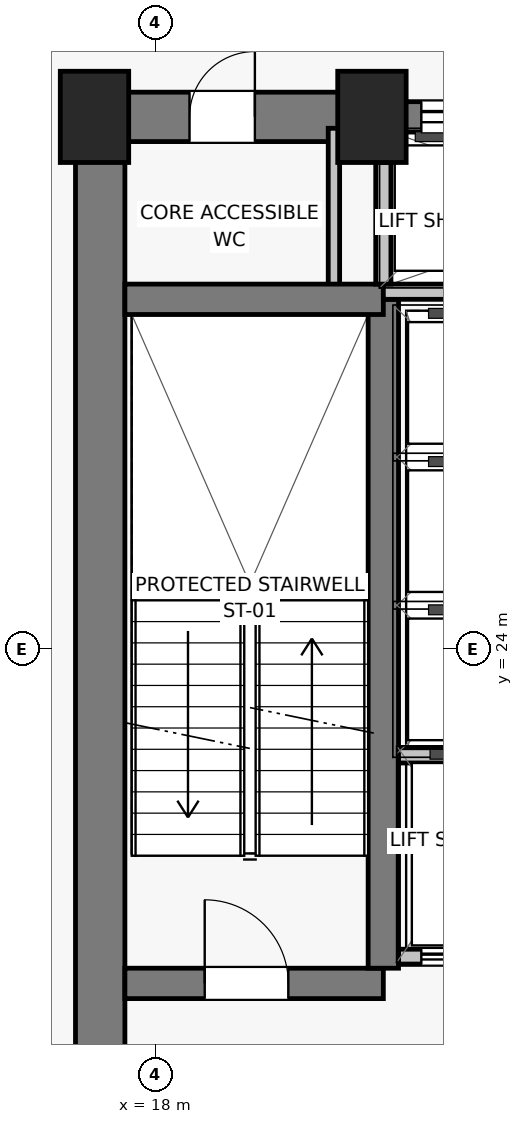
"""IFC4 building model, lengths in metres.
Left out: names, types, materials, properties, quantities, classifications, styles, units other than length and angle.
Written with IfcOpenShell. Run it as: python <this file> out.ifc"""

import sys

from ifc_helpers import new_model, si_unit, direction, frame, frame_2d, origin, origin_2d, place, context, subcontext, project, spatial, rectangle, extrude, source, transform, mapped, element, fill, save


model = new_model("IFC4")
c1 = context("Model", 3, precision=1e-05, world=origin(), true_north=direction((0.0, 1.0)))
c2 = subcontext(c1, "Body", "Model", "MODEL_VIEW")
j1 = project(units=[si_unit("LENGTHUNIT", "METRE"), si_unit("PLANEANGLEUNIT", "RADIAN")], contexts=[c1])
p1 = place(None, origin())
s1 = spatial("IfcSite", under=j1, at=p1, CompositionType="ELEMENT")
p2 = place(p1, origin())
s2 = spatial("IfcBuilding", under=s1, at=p2, CompositionType="ELEMENT")
p3 = place(p2, frame((0.0, 0.0, 85.15)))
s3 = spatial("IfcBuildingStorey", under=s2, at=p3, CompositionType="ELEMENT", Elevation=85.15)
for number, where, z_axis, x_axis in (
    (1, (17.2, 31.0, 0.0), (0.0, 0.0, 1.0), (1.0, 0.0, 0.0)),
    (2, (20.85, 31.0, 0.0), (0.0, 0.0, 1.0), (1.0, 0.0, 0.0)),
):
    element("IfcColumn", number, at=place(p3, frame(where, z_axis=z_axis, x_axis=x_axis)), inside=s3, PredefinedType="PILASTER", context=c2, shape_type="SweptSolid", body=[
        extrude(rectangle(XDim=0.9, YDim=1.2, at=origin_2d()), origin(), (0.0, 0.0, 1.0), 4.3),
    ])
p4 = place(p3, frame((17.275, 16.8, 0.0), z_axis=(0.0, 0.0, 1.0), x_axis=(0.0, 1.0, 0.0)))
e3 = element("IfcWall", 3, at=p4, inside=s3, PredefinedType="SHEAR", context=c2, shape_type="SweptSolid", body=[
    extrude(rectangle(XDim=14.2, YDim=0.65, at=frame_2d((7.1, 0.0))), origin(), (0.0, 0.0, 1.0), 4.05),
])
p5 = place(p3, frame((17.2, 31.0, 0.0), z_axis=(0.0, 0.0, 1.0), x_axis=(1.0, 0.0, 0.0)))
e4 = element("IfcWall", 4, at=p5, inside=s3, PredefinedType="SHEAR", context=c2, shape_type="SweptSolid", body=[
    extrude(rectangle(XDim=3.8, YDim=0.65, at=frame_2d((1.9, 0.0))), origin(), (0.0, 0.0, 1.0), 4.05),
])
p6 = place(p5, frame((1.25, 0.0, 0.0)))
e5 = element("IfcOpeningElement", 5, at=p6, cuts=e4, PredefinedType="OPENING", context=c2, shape_type="SweptSolid", body=[
    extrude(rectangle(XDim=0.86, YDim=2.01, at=frame_2d((0.43, 1.005))), frame((0.0, 0.335, 0.0), z_axis=(0.0, -1.0, 0.0), x_axis=(1.0, 0.0, 0.0)), (0.0, 0.0, 1.0), 0.67),
])
p7 = place(p3, frame((21.0, 31.0, 0.0), z_axis=(0.0, 0.0, 1.0), x_axis=(1.0, 0.0, 0.0)))
e6 = element("IfcWall", 6, at=p7, inside=s3, PredefinedType="SHEAR", context=c2, shape_type="SweptSolid", body=[
    extrude(rectangle(XDim=6.0, YDim=0.4, at=frame_2d((3.0, 0.0))), origin(), (0.0, 0.0, 1.0), 4.05),
])
p8 = place(p7, frame((0.5, 0.0, 0.0)))
e7 = element("IfcOpeningElement", 7, at=p8, cuts=e6, PredefinedType="OPENING", context=c2, shape_type="SweptSolid", body=[
    extrude(rectangle(XDim=1.1, YDim=2.08, at=frame_2d((0.55, 1.04))), frame((0.0, 0.21, 0.0), z_axis=(0.0, -1.0, 0.0), x_axis=(1.0, 0.0, 0.0)), (0.0, 0.0, 1.0), 0.42),
])
p9 = place(p7, frame((2.45, 0.0, 0.0)))
e8 = element("IfcOpeningElement", 8, at=p9, cuts=e6, PredefinedType="OPENING", context=c2, shape_type="SweptSolid", body=[
    extrude(rectangle(XDim=1.1, YDim=2.08, at=frame_2d((0.55, 1.04))), frame((0.0, 0.21, 0.0), z_axis=(0.0, -1.0, 0.0), x_axis=(1.0, 0.0, 0.0)), (0.0, 0.0, 1.0), 0.42),
])
p10 = place(p7, frame((4.4, 0.0, 0.0)))
e9 = element("IfcOpeningElement", 9, at=p10, cuts=e6, PredefinedType="OPENING", context=c2, shape_type="SweptSolid", body=[
    extrude(rectangle(XDim=1.1, YDim=2.08, at=frame_2d((0.55, 1.04))), frame((0.0, 0.21, 0.0), z_axis=(0.0, -1.0, 0.0), x_axis=(1.0, 0.0, 0.0)), (0.0, 0.0, 1.0), 0.42),
])
p11 = place(p3, frame((20.35, 28.65, 0.0), z_axis=(0.0, 0.0, 1.0), x_axis=(0.0, 1.0, 0.0)))
e10 = element("IfcWall", 10, at=p11, inside=s3, PredefinedType="PARTITIONING", context=c2, shape_type="SweptSolid", body=[
    extrude(rectangle(XDim=2.2, YDim=0.15, at=frame_2d((1.1, 0.0))), origin(), (0.0, 0.0, 1.0), 4.05),
])
p12 = place(p3, frame((17.6, 19.6, 0.0), z_axis=(0.0, 0.0, 1.0), x_axis=(1.0, 0.0, 0.0)))
e11 = element("IfcWall", 11, at=p12, inside=s3, PredefinedType="SHEAR", context=c2, shape_type="SweptSolid", body=[
    extrude(rectangle(XDim=3.4, YDim=0.4, at=frame_2d((1.7, 0.0))), origin(), (0.0, 0.0, 1.0), 4.05),
])
p13 = place(p12, frame((1.05, 0.0, 0.0)))
e12 = element("IfcOpeningElement", 12, at=p13, cuts=e11, PredefinedType="OPENING", context=c2, shape_type="SweptSolid", body=[
    extrude(rectangle(XDim=1.1, YDim=2.03, at=frame_2d((0.55, 1.015))), frame((0.0, 0.21, 0.0), z_axis=(0.0, -1.0, 0.0), x_axis=(1.0, 0.0, 0.0)), (0.0, 0.0, 1.0), 0.42),
])
p14 = place(p3, frame((21.2, 19.95, 0.0), z_axis=(0.0, 0.0, 1.0), x_axis=(1.0, 0.0, 0.0)))
e13 = element("IfcWall", 13, at=p14, inside=s3, PredefinedType="SOLIDWALL", context=c2, shape_type="SweptSolid", body=[
    extrude(rectangle(XDim=1.85, YDim=0.2, at=frame_2d((0.925, 0.0))), origin(), (0.0, 0.0, 1.0), 4.05),
])
p15 = place(p14, frame((0.3, 0.0, 0.0)))
e14 = element("IfcOpeningElement", 14, at=p15, cuts=e13, PredefinedType="OPENING", context=c2, shape_type="SweptSolid", body=[
    extrude(rectangle(XDim=1.3, YDim=2.25, at=frame_2d((0.65, 1.125))), frame((0.0, 0.11, 0.0), z_axis=(0.0, -1.0, 0.0), x_axis=(1.0, 0.0, 0.0)), (0.0, 0.0, 1.0), 0.22),
])
p16 = place(p3, frame((21.0, 19.8, 0.0), z_axis=(0.0, 0.0, 1.0), x_axis=(0.0, 1.0, 0.0)))
e15 = element("IfcWall", 15, at=p16, inside=s3, PredefinedType="SHEAR", context=c2, shape_type="SweptSolid", body=[
    extrude(rectangle(XDim=8.8, YDim=0.4, at=frame_2d((4.4, 0.0))), origin(), (0.0, 0.0, 1.0), 4.05),
])
p17 = place(p3, frame((17.6, 28.6, 0.0), z_axis=(0.0, 0.0, 1.0), x_axis=(1.0, 0.0, 0.0)))
e16 = element("IfcWall", 16, at=p17, inside=s3, PredefinedType="SHEAR", context=c2, shape_type="SweptSolid", body=[
    extrude(rectangle(XDim=3.4, YDim=0.4, at=frame_2d((1.7, 0.0))), origin(), (0.0, 0.0, 1.0), 4.05),
])
p18 = place(p3, frame((21.2, 22.6, 0.0), z_axis=(0.0, 0.0, 1.0), x_axis=(1.0, 0.0, 0.0)))
e17 = element("IfcWall", 17, at=p18, inside=s3, PredefinedType="SOLIDWALL", context=c2, shape_type="SweptSolid", body=[
    extrude(rectangle(XDim=1.95, YDim=0.2, at=frame_2d((0.975, 0.0))), origin(), (0.0, 0.0, 1.0), 4.05),
])
p19 = place(p3, frame((21.0, 28.7, 0.0), z_axis=(0.0, 0.0, 1.0), x_axis=(1.0, 0.0, 0.0)))
e18 = element("IfcWall", 18, at=p19, inside=s3, PredefinedType="SOLIDWALL", context=c2, shape_type="SweptSolid", body=[
    extrude(rectangle(XDim=6.0, YDim=0.2, at=frame_2d((3.0, 0.0))), origin(), (0.0, 0.0, 1.0), 4.05),
])
p20 = place(p3, frame((21.0, 28.8, 0.0), z_axis=(0.0, 0.0, 1.0), x_axis=(0.0, 1.0, 0.0)))
e19 = element("IfcWall", 19, at=p20, inside=s3, PredefinedType="SOLIDWALL", context=c2, shape_type="SweptSolid", body=[
    extrude(rectangle(XDim=1.6, YDim=0.2, at=frame_2d((0.8, 0.0))), origin(), (0.0, 0.0, 1.0), 4.05),
])
m1 = source(origin(), c2, "Body", "SweptSolid", [
    extrude(rectangle(XDim=0.86, YDim=2.01, at=frame_2d((0.43, 1.005))), frame((0.0, 0.025, 0.0), z_axis=(0.0, -1.0, 0.0), x_axis=(1.0, 0.0, 0.0)), (0.0, 0.0, 1.0), 0.05),
])
p21 = place(p6, origin())
e20 = element("IfcDoor", 20, at=p21, inside=s3, OperationType="SINGLE_SWING_RIGHT", PredefinedType="DOOR", context=c2, shape_type="MappedRepresentation", body=[
    mapped(m1, transform((0.0, 0.0, 0.0), scale=1.0)),
])
fill(e5, e20)
m2 = source(origin(), c2, "Body", "SweptSolid", [
    extrude(rectangle(XDim=1.1, YDim=2.08, at=frame_2d((0.55, 1.04))), frame((0.0, 0.025, 0.0), z_axis=(0.0, -1.0, 0.0), x_axis=(1.0, 0.0, 0.0)), (0.0, 0.0, 1.0), 0.05),
])
p22 = place(p8, origin())
e21 = element("IfcDoor", 21, at=p22, inside=s3, OperationType="SLIDING_TO_LEFT", PredefinedType="DOOR", context=c2, shape_type="MappedRepresentation", body=[
    mapped(m2, transform((0.0, 0.0, 0.0), scale=1.0)),
])
fill(e7, e21)
m3 = source(origin(), c2, "Body", "SweptSolid", [
    extrude(rectangle(XDim=1.1, YDim=2.03, at=frame_2d((0.55, 1.015))), frame((0.0, 0.025, 0.0), z_axis=(0.0, -1.0, 0.0), x_axis=(1.0, 0.0, 0.0)), (0.0, 0.0, 1.0), 0.05),
])
p23 = place(p13, origin())
e22 = element("IfcDoor", 22, at=p23, inside=s3, OperationType="SINGLE_SWING_LEFT", PredefinedType="DOOR", context=c2, shape_type="MappedRepresentation", body=[
    mapped(m3, transform((0.0, 0.0, 0.0), scale=1.0)),
])
fill(e12, e22)
m4 = source(origin(), c2, "Body", "SweptSolid", [
    extrude(rectangle(XDim=1.3, YDim=2.25, at=frame_2d((0.65, 1.125))), frame((0.0, 0.025, 0.0), z_axis=(0.0, -1.0, 0.0), x_axis=(1.0, 0.0, 0.0)), (0.0, 0.0, 1.0), 0.05),
])
p24 = place(p15, origin())
e23 = element("IfcDoor", 23, at=p24, inside=s3, OperationType="SLIDING_TO_LEFT", PredefinedType="DOOR", context=c2, shape_type="MappedRepresentation", body=[
    mapped(m4, transform((0.0, 0.0, 0.0), scale=1.0)),
])
fill(e14, e23)
save(model, sys.argv[1])
